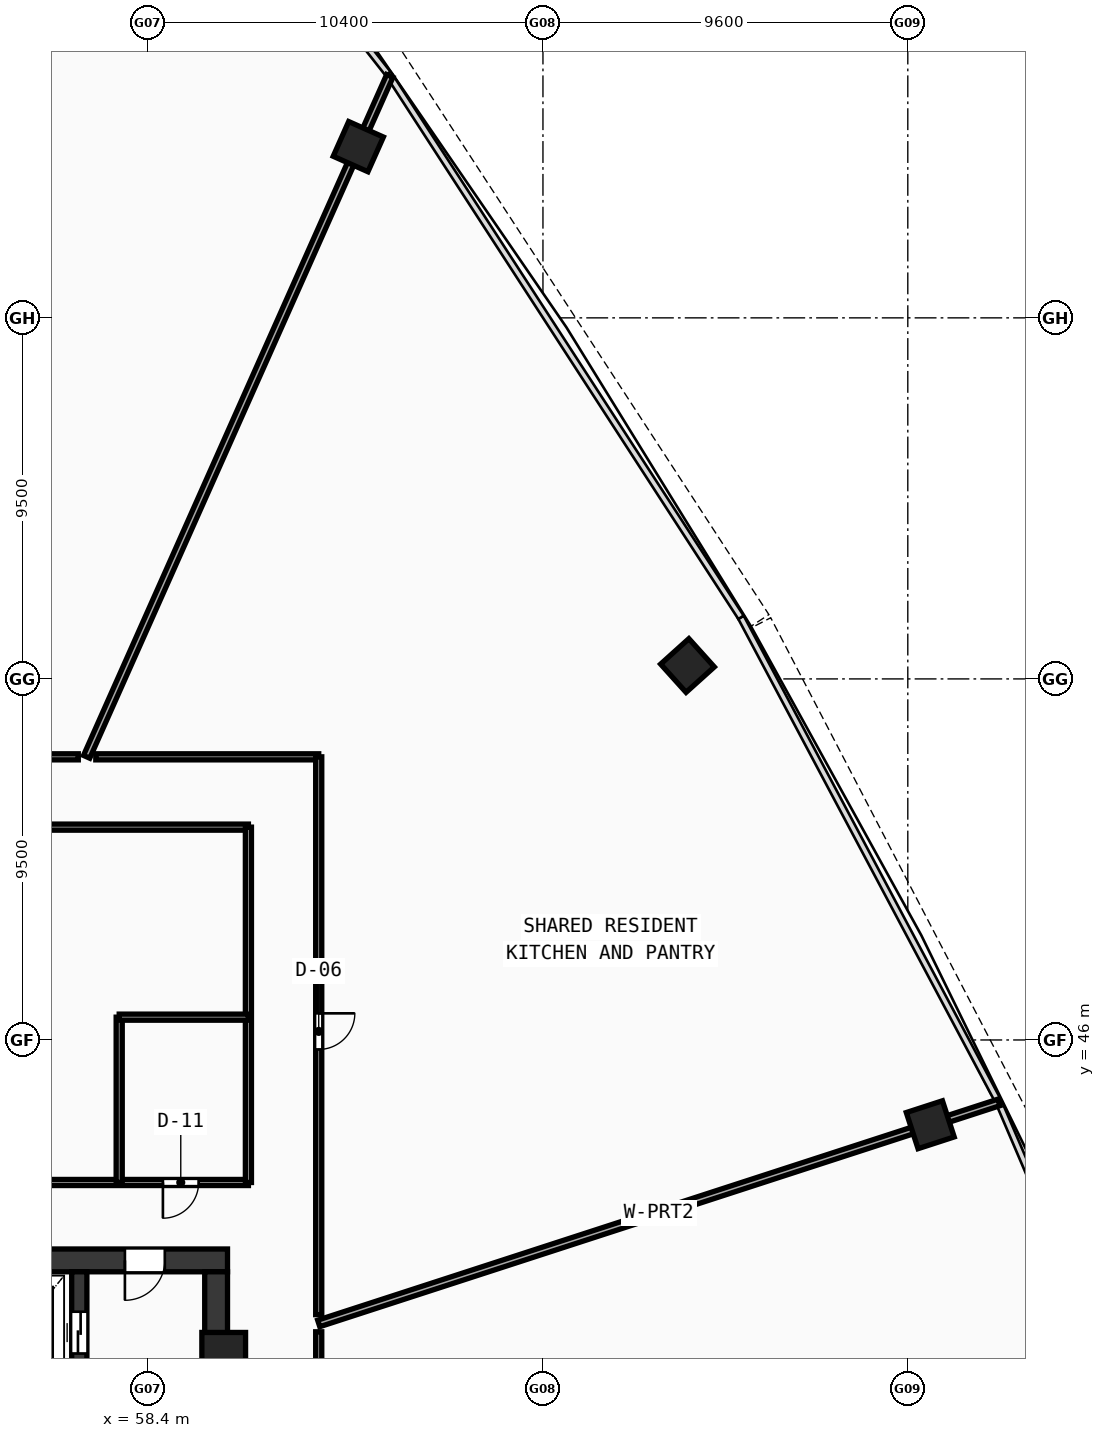
"""IFC4 building model, lengths in metres.
Left out: names, types, materials, properties, quantities, classifications, styles, units other than length and angle.
Written with IfcOpenShell. Run it as: python <this file> out.ifc"""

import sys

from ifc_helpers import new_model, si_unit, direction, frame, frame_2d, origin, origin_with_axes, origin_2d, place, context, subcontext, project, spatial, rectangle, hollow_rectangle, extrude, source, transform, mapped, element, fill, save


model = new_model("IFC4")
c1 = context("Model", 3, precision=1e-05, world=origin(), true_north=direction((0.0, 1.0)))
c2 = subcontext(c1, "Body", "Model", "MODEL_VIEW")
j1 = project(units=[si_unit("LENGTHUNIT", "METRE"), si_unit("PLANEANGLEUNIT", "RADIAN")], contexts=[c1])
p1 = place(None, origin())
s1 = spatial("IfcSite", under=j1, at=p1, CompositionType="ELEMENT")
p2 = place(p1, origin())
s2 = spatial("IfcBuilding", under=s1, at=p2, CompositionType="ELEMENT")
p3 = place(p2, frame((0.0, 0.0, 92.58)))
s3 = spatial("IfcBuildingStorey", under=s2, at=p3, CompositionType="ELEMENT", Elevation=92.58)
p4 = place(p3, frame((49.2, 40.2, 0.0), z_axis=(0.0, 0.0, 1.0), x_axis=(1.0, 0.0, 0.0)))
e1 = element("IfcWall", 1, at=p4, inside=s3, PredefinedType="SHEAR", context=c2, shape_type="SweptSolid", body=[
    extrude(rectangle(XDim=11.3, YDim=0.6, at=frame_2d((5.65, 0.0))), origin(), (0.0, 0.0, 1.0), 3.54),
])
p5 = place(p4, frame((8.6, 0.0, 0.0)))
e2 = element("IfcOpeningElement", 2, at=p5, cuts=e1, PredefinedType="OPENING", context=c2, shape_type="SweptSolid", body=[
    extrude(rectangle(XDim=1.05, YDim=2.1, at=frame_2d((0.525, 1.05))), frame((0.0, 0.31, 0.0), z_axis=(0.0, -1.0, 0.0), x_axis=(1.0, 0.0, 0.0)), (0.0, 0.0, 1.0), 0.62),
])
p6 = place(p3, frame((60.2, 27.8, 0.0), z_axis=(0.0, 0.0, 1.0), x_axis=(0.0, 1.0, 0.0)))
e3 = element("IfcWall", 3, at=p6, inside=s3, PredefinedType="SHEAR", context=c2, shape_type="SweptSolid", body=[
    extrude(rectangle(XDim=12.1, YDim=0.6, at=frame_2d((6.05, 0.0))), origin(), (0.0, 0.0, 1.0), 3.54),
])
p7 = place(p3, frame((56.6, 27.8, 0.0), z_axis=(0.0, 0.0, 1.0), x_axis=(0.0, 1.0, 0.0)))
e4 = element("IfcWall", 4, at=p7, inside=s3, PredefinedType="SHEAR", context=c2, shape_type="SweptSolid", body=[
    extrude(rectangle(XDim=12.1, YDim=0.4, at=frame_2d((6.05, 0.0))), origin(), (0.0, 0.0, 1.0), 3.54),
])
p8 = place(p7, frame((9.95, 0.0, 0.0)))
e5 = element("IfcOpeningElement", 5, at=p8, cuts=e4, PredefinedType="OPENING", context=c2, shape_type="SweptSolid", body=[
    extrude(rectangle(XDim=1.1, YDim=2.1, at=frame_2d((0.55, 1.05))), frame((0.0, 0.21, 0.0), z_axis=(0.0, -1.0, 0.0), x_axis=(1.0, 0.0, 0.0)), (0.0, 0.0, 1.0), 0.42),
])
m1 = source(origin(), c2, "Body", "SweptSolid", [
    extrude(hollow_rectangle(XDim=1.15, YDim=1.15, WallThickness=0.048, at=origin_2d()), origin(), (0.0, 0.0, 1.0), 3.8),
])
p9 = place(p3, frame((60.4, 37.729, -0.26), z_axis=(0.0, 0.0, 1.0), x_axis=(1.0, 0.0, 0.0)))
e6 = element("IfcColumn", 6, at=p9, inside=s3, PredefinedType="COLUMN", context=c2, shape_type="MappedRepresentation", body=[
    mapped(m1, transform((0.0, 0.0, 0.0), scale=1.0)),
])
m2 = source(origin(), c2, "Body", "SweptSolid", [
    extrude(hollow_rectangle(XDim=1.0, YDim=1.0, WallThickness=0.042, at=origin_2d()), origin(), (0.0, 0.0, 1.0), 3.8),
])
for number, where, z_axis, x_axis in (
    (7, (78.991, 43.77, -0.26), (0.0, 0.0, 1.0), (-0.309, 0.951, 0.0)),
    (8, (72.603, 55.852, -0.26), (0.0, 0.0, 1.0), (-0.669, 0.743, 0.0)),
    (9, (63.941, 69.505, -0.26), (0.0, 0.0, 1.0), (-0.914, 0.407, 0.0)),
):
    element("IfcColumn", number, at=place(p3, frame(where, z_axis=z_axis, x_axis=x_axis)), inside=s3, PredefinedType="COLUMN", context=c2, shape_type="MappedRepresentation", body=[
        mapped(m2, transform((0.0, 0.0, 0.0), scale=1.0)),
    ])
p10 = place(p3, frame((45.92, 42.25, 0.0), z_axis=(0.0, 0.0, 1.0), x_axis=(1.0, 0.0, 0.0)))
e10 = element("IfcWall", 10, at=p10, inside=s3, PredefinedType="PARTITIONING", context=c2, shape_type="SweptSolid", body=[
    extrude(rectangle(XDim=15.13, YDim=0.16, at=frame_2d((7.565, 0.0))), origin(), (0.0, 0.0, 1.0), 2.84),
])
p11 = place(p10, frame((2.1, 0.0, 0.0)))
e11 = element("IfcOpeningElement", 11, at=p11, cuts=e10, PredefinedType="OPENING", context=c2, shape_type="SweptSolid", body=[
    extrude(rectangle(XDim=0.92, YDim=2.1, at=frame_2d((0.46, 1.05))), frame((0.0, 0.09, 0.0), z_axis=(0.0, -1.0, 0.0), x_axis=(1.0, 0.0, 0.0)), (0.0, 0.0, 1.0), 0.18),
])
p12 = place(p10, frame((12.88, 0.0, 0.0)))
e12 = element("IfcOpeningElement", 12, at=p12, cuts=e10, PredefinedType="OPENING", context=c2, shape_type="SweptSolid", body=[
    extrude(rectangle(XDim=0.94, YDim=2.1, at=frame_2d((0.47, 1.05))), frame((0.0, 0.09, 0.0), z_axis=(0.0, -1.0, 0.0), x_axis=(1.0, 0.0, 0.0)), (0.0, 0.0, 1.0), 0.18),
])
p13 = place(p3, frame((45.92, 51.6, 0.0), z_axis=(0.0, 0.0, 1.0), x_axis=(1.0, 0.0, 0.0)))
e13 = element("IfcWall", 13, at=p13, inside=s3, PredefinedType="PARTITIONING", context=c2, shape_type="SweptSolid", body=[
    extrude(rectangle(XDim=15.13, YDim=0.16, at=frame_2d((7.565, 0.0))), origin(), (0.0, 0.0, 1.0), 2.84),
])
p14 = place(p3, frame((61.05, 42.25, 0.0), z_axis=(0.0, 0.0, 1.0), x_axis=(0.0, 1.0, 0.0)))
e14 = element("IfcWall", 14, at=p14, inside=s3, PredefinedType="PARTITIONING", context=c2, shape_type="SweptSolid", body=[
    extrude(rectangle(XDim=9.35, YDim=0.16, at=frame_2d((4.675, 0.0))), origin(), (0.0, 0.0, 1.0), 2.84),
])
p15 = place(p3, frame((57.65, 42.25, 0.0), z_axis=(0.0, 0.0, 1.0), x_axis=(0.0, 1.0, 0.0)))
e15 = element("IfcWall", 15, at=p15, inside=s3, PredefinedType="PARTITIONING", context=c2, shape_type="SweptSolid", body=[
    extrude(rectangle(XDim=4.35, YDim=0.16, at=frame_2d((2.175, 0.0))), origin(), (0.0, 0.0, 1.0), 2.84),
])
p16 = place(p3, frame((57.65, 46.6, 0.0), z_axis=(0.0, 0.0, 1.0), x_axis=(1.0, 0.0, 0.0)))
e16 = element("IfcWall", 16, at=p16, inside=s3, PredefinedType="PARTITIONING", context=c2, shape_type="SweptSolid", body=[
    extrude(rectangle(XDim=3.4, YDim=0.16, at=frame_2d((1.7, 0.0))), origin(), (0.0, 0.0, 1.0), 3.14),
])
p17 = place(p3, frame((62.9, 38.541, 0.0), z_axis=(0.0, 0.0, 1.0), x_axis=(0.951056186137, 0.309018010496, 0.0)))
e17 = element("IfcWall", 17, at=p17, inside=s3, PredefinedType="PARTITIONING", context=c2, shape_type="SweptSolid", body=[
    extrude(rectangle(XDim=18.817, YDim=0.18, at=frame_2d((9.409, 0.0))), origin(), (0.0, 0.0, 1.0), 2.84),
])
p18 = place(p3, frame((56.793, 53.45, 0.0), z_axis=(0.0, 0.0, 1.0), x_axis=(0.406741294252, 0.913543386791, 0.0)))
e18 = element("IfcWall", 18, at=p18, inside=s3, PredefinedType="PARTITIONING", context=c2, shape_type="SweptSolid", body=[
    extrude(rectangle(XDim=19.612, YDim=0.18, at=frame_2d((9.806, 0.0))), origin(), (0.0, 0.0, 1.0), 2.84),
])
p19 = place(p3, frame((45.85, 53.45, 0.0), z_axis=(0.0, 0.0, 1.0), x_axis=(1.0, 0.0, 0.0)))
e19 = element("IfcWall", 19, at=p19, inside=s3, PredefinedType="PARTITIONING", context=c2, shape_type="SweptSolid", body=[
    extrude(rectangle(XDim=10.723, YDim=0.16, at=frame_2d((5.362, 0.0))), origin(), (0.0, 0.0, 1.0), 2.84),
])
p20 = place(p19, frame((4.781, 0.0, 0.0)))
e20 = element("IfcOpeningElement", 20, at=p20, cuts=e19, PredefinedType="OPENING", context=c2, shape_type="SweptSolid", body=[
    extrude(rectangle(XDim=0.92, YDim=2.1, at=frame_2d((0.46, 1.05))), frame((0.0, 0.09, 0.0), z_axis=(0.0, -1.0, 0.0), x_axis=(1.0, 0.0, 0.0)), (0.0, 0.0, 1.0), 0.18),
])
p21 = place(p3, frame((57.034, 53.45, 0.0), z_axis=(0.0, 0.0, 1.0), x_axis=(1.0, 0.0, 0.0)))
e21 = element("IfcWall", 21, at=p21, inside=s3, PredefinedType="PARTITIONING", context=c2, shape_type="SweptSolid", body=[
    extrude(rectangle(XDim=5.866, YDim=0.16, at=frame_2d((2.933, 0.0))), origin(), (0.0, 0.0, 1.0), 3.54),
])
p22 = place(p3, frame((62.9, 53.45, 0.0), z_axis=(0.0, 0.0, 1.0), x_axis=(0.0, -1.0, 0.0)))
e22 = element("IfcWall", 22, at=p22, inside=s3, PredefinedType="PARTITIONING", context=c2, shape_type="SweptSolid", body=[
    extrude(rectangle(XDim=14.677, YDim=0.16, at=frame_2d((7.339, 0.0))), origin(), (0.0, 0.0, 1.0), 2.84),
])
p23 = place(p22, frame((6.75, 0.0, 0.0)))
e23 = element("IfcOpeningElement", 23, at=p23, cuts=e22, PredefinedType="OPENING", context=c2, shape_type="SweptSolid", body=[
    extrude(rectangle(XDim=0.95, YDim=2.1, at=frame_2d((0.475, 1.05))), frame((0.0, 0.09, 0.0), z_axis=(0.0, -1.0, 0.0), x_axis=(1.0, 0.0, 0.0)), (0.0, 0.0, 1.0), 0.18),
])
p24 = place(p3, frame((62.9, 38.322, 0.0), z_axis=(0.0, 0.0, 1.0), x_axis=(0.0, -1.0, 0.0)))
e24 = element("IfcWall", 24, at=p24, inside=s3, PredefinedType="PARTITIONING", context=c2, shape_type="SweptSolid", body=[
    extrude(rectangle(XDim=7.029, YDim=0.16, at=frame_2d((3.515, 0.0))), origin(), (0.0, 0.0, 1.0), 3.54),
])
p25 = place(p24, frame((3.054, 0.0, 0.0)))
e25 = element("IfcOpeningElement", 25, at=p25, cuts=e24, PredefinedType="OPENING", context=c2, shape_type="SweptSolid", body=[
    extrude(rectangle(XDim=0.92, YDim=2.1, at=frame_2d((0.46, 1.05))), frame((0.0, 0.09, 0.0), z_axis=(0.0, -1.0, 0.0), x_axis=(1.0, 0.0, 0.0)), (0.0, 0.0, 1.0), 0.18),
])
m3 = source(origin(), c2, "Body", "SweptSolid", [
    extrude(rectangle(XDim=1.05, YDim=2.1, at=frame_2d((0.525, 1.05))), frame((0.0, 0.025, 0.0), z_axis=(0.0, -1.0, 0.0), x_axis=(1.0, 0.0, 0.0)), (0.0, 0.0, 1.0), 0.05),
])
p26 = place(p5, frame((1.05, 0.0, 0.0), z_axis=(0.0, 0.0, 1.0), x_axis=(-1.0, 0.0, 0.0)))
e26 = element("IfcDoor", 26, at=p26, inside=s3, OperationType="SINGLE_SWING_RIGHT", PredefinedType="DOOR", context=c2, shape_type="MappedRepresentation", body=[
    mapped(m3, transform((0.0, 0.0, 0.0), scale=1.0)),
])
fill(e2, e26)
m4 = source(origin(), c2, "Body", "SweptSolid", [
    extrude(rectangle(XDim=1.1, YDim=2.1, at=frame_2d((0.55, 1.05))), frame((0.0, 0.025, 0.0), z_axis=(0.0, -1.0, 0.0), x_axis=(1.0, 0.0, 0.0)), (0.0, 0.0, 1.0), 0.05),
])
p27 = place(p8, origin_with_axes())
e27 = element("IfcDoor", 27, at=p27, inside=s3, OperationType="DOUBLE_DOOR_SLIDING", PredefinedType="DOOR", context=c2, shape_type="MappedRepresentation", body=[
    mapped(m4, transform((0.0, 0.0, 0.0), scale=1.0)),
])
fill(e5, e27)
m5 = source(origin(), c2, "Body", "SweptSolid", [
    extrude(rectangle(XDim=0.94, YDim=2.1, at=frame_2d((0.47, 1.05))), frame((0.0, 0.025, 0.0), z_axis=(0.0, -1.0, 0.0), x_axis=(1.0, 0.0, 0.0)), (0.0, 0.0, 1.0), 0.05),
])
p28 = place(p12, frame((0.94, 0.0, 0.0), z_axis=(0.0, 0.0, 1.0), x_axis=(-1.0, 0.0, 0.0)))
e28 = element("IfcDoor", 28, at=p28, inside=s3, OperationType="SINGLE_SWING_RIGHT", PredefinedType="DOOR", context=c2, shape_type="MappedRepresentation", body=[
    mapped(m5, transform((0.0, 0.0, 0.0), scale=1.0)),
])
fill(e12, e28)
m6 = source(origin(), c2, "Body", "SweptSolid", [
    extrude(rectangle(XDim=0.95, YDim=2.1, at=frame_2d((0.475, 1.05))), frame((0.0, 0.025, 0.0), z_axis=(0.0, -1.0, 0.0), x_axis=(1.0, 0.0, 0.0)), (0.0, 0.0, 1.0), 0.05),
])
p29 = place(p23, origin_with_axes())
e29 = element("IfcDoor", 29, at=p29, inside=s3, OperationType="SINGLE_SWING_LEFT", PredefinedType="DOOR", context=c2, shape_type="MappedRepresentation", body=[
    mapped(m6, transform((0.0, 0.0, 0.0), scale=1.0)),
])
fill(e23, e29)
save(model, sys.argv[1])
